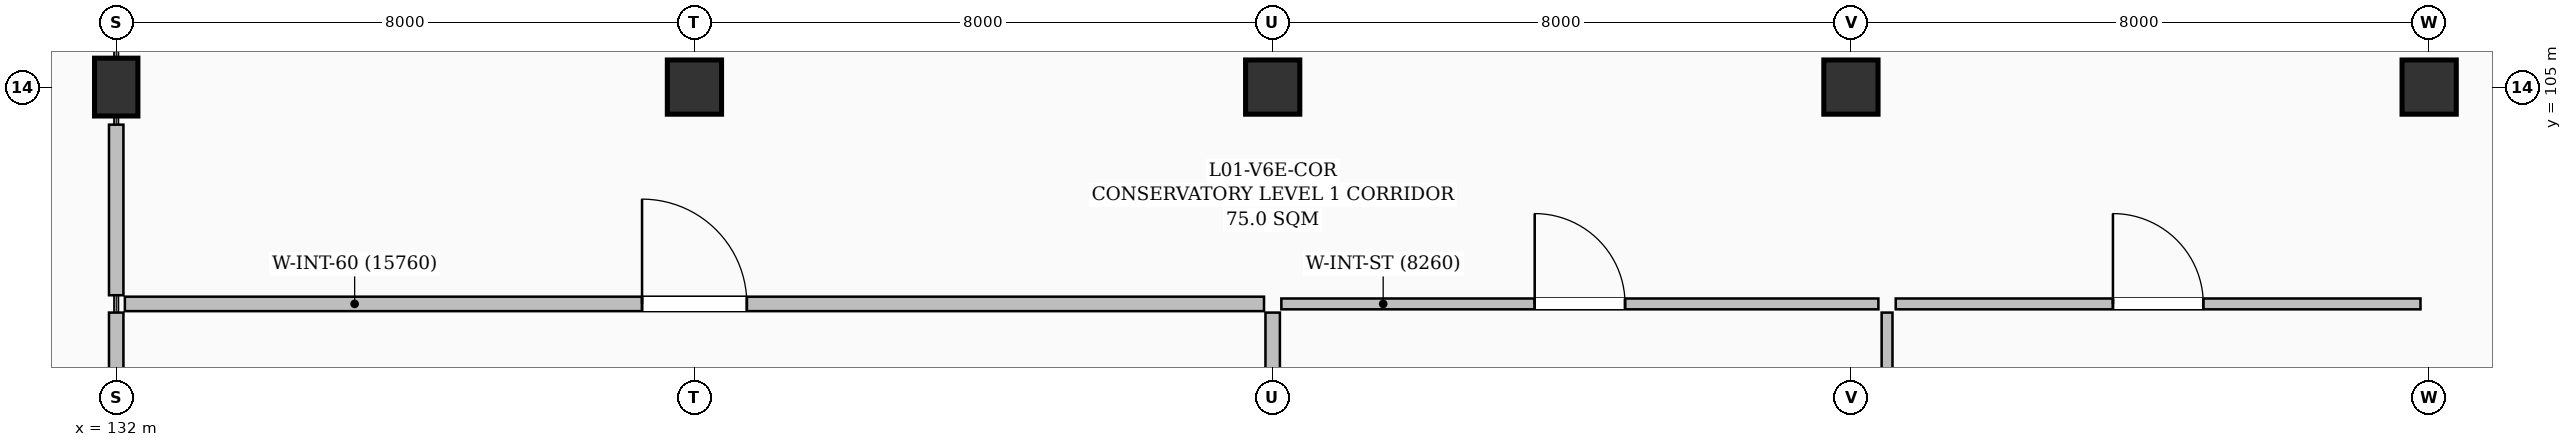
"""IFC4 building model, lengths in metres.
Left out: names, types, materials, properties, quantities, classifications, styles, units other than length and angle.
Written with IfcOpenShell. Run it as: python <this file> out.ifc"""

import sys

from ifc_helpers import new_model, si_unit, direction, frame, frame_2d, origin, origin_2d, place, context, subcontext, project, spatial, rectangle, extrude, element, fill, save


model = new_model("IFC4")
c1 = context("Model", 3, precision=1e-05, world=origin(), true_north=direction((0.0, 1.0)))
c2 = subcontext(c1, "Body", "Model", "MODEL_VIEW")
j1 = project(units=[si_unit("LENGTHUNIT", "METRE"), si_unit("PLANEANGLEUNIT", "RADIAN")], contexts=[c1])
p1 = place(None, origin())
s1 = spatial("IfcSite", under=j1, at=p1, CompositionType="ELEMENT")
p2 = place(p1, origin())
s2 = spatial("IfcBuilding", under=s1, at=p2, CompositionType="ELEMENT")
p3 = place(p2, frame((0.0, 0.0, 4.8)))
s3 = spatial("IfcBuildingStorey", under=s2, at=p3, CompositionType="ELEMENT", Elevation=4.8)
p4 = place(p3, frame((132.0, 105.0, 0.0), z_axis=(0.0, 0.0, 1.0), x_axis=(1.0, 0.0, 0.0)))
e1 = element("IfcColumn", 1, at=p4, inside=s3, PredefinedType="COLUMN", context=c2, shape_type="SweptSolid", body=[
    extrude(rectangle(XDim=0.6, YDim=0.8, at=origin_2d()), origin(), (0.0, 0.0, 1.0), 4.5),
])
for number, where, z_axis, x_axis in (
    (2, (140.0, 105.0, 0.0), (0.0, 0.0, 1.0), (1.0, 0.0, 0.0)),
    (3, (148.0, 105.0, 0.0), (0.0, 0.0, 1.0), (1.0, 0.0, 0.0)),
    (4, (156.0, 105.0, 0.0), (0.0, 0.0, 1.0), (1.0, 0.0, 0.0)),
    (5, (164.0, 105.0, 0.0), (0.0, 0.0, 1.0), (1.0, 0.0, 0.0)),
):
    element("IfcColumn", number, at=place(p3, frame(where, z_axis=z_axis, x_axis=x_axis)), inside=s3, PredefinedType="COLUMN", context=c2, shape_type="SweptSolid", body=[
        extrude(rectangle(XDim=0.75, YDim=0.75, at=origin_2d()), origin(), (0.0, 0.0, 1.0), 4.5),
    ])
p5 = place(p3, frame((132.0, 95.42, 0.0), z_axis=(0.0, 0.0, 1.0), x_axis=(0.0, 1.0, 0.0)))
e6 = element("IfcWall", 6, at=p5, inside=s3, PredefinedType="PARTITIONING", context=c2, shape_type="SweptSolid", body=[
    extrude(rectangle(XDim=6.46, YDim=0.2, at=frame_2d((3.23, 0.0))), origin(), (0.0, 0.0, 1.0), 3.785),
])
p6 = place(p5, frame((2.505, 0.0, 0.0)))
e7 = element("IfcOpeningElement", 7, at=p6, cuts=e6, PredefinedType="OPENING", context=c2, shape_type="SweptSolid", body=[
    extrude(rectangle(XDim=1.45, YDim=2.25, at=frame_2d((0.725, 1.125))), frame((0.0, 0.11, 0.0), z_axis=(0.0, -1.0, 0.0), x_axis=(1.0, 0.0, 0.0)), (0.0, 0.0, 1.0), 0.22),
])
p7 = place(p3, frame((132.0, 102.12, 0.0), z_axis=(0.0, 0.0, 1.0), x_axis=(0.0, 1.0, 0.0)))
e8 = element("IfcWall", 8, at=p7, inside=s3, PredefinedType="PARTITIONING", context=c2, shape_type="SweptSolid", body=[
    extrude(rectangle(XDim=2.36, YDim=0.2, at=frame_2d((1.18, 0.0))), origin(), (0.0, 0.0, 1.0), 3.785),
])
p8 = place(p3, frame((132.12, 102.0, 0.0), z_axis=(0.0, 0.0, 1.0), x_axis=(1.0, 0.0, 0.0)))
e9 = element("IfcWall", 9, at=p8, inside=s3, PredefinedType="PARTITIONING", context=c2, shape_type="SweptSolid", body=[
    extrude(rectangle(XDim=15.76, YDim=0.2, at=frame_2d((7.88, 0.0))), origin(), (0.0, 0.0, 1.0), 3.875),
])
p9 = place(p8, frame((7.155, 0.0, 0.0)))
e10 = element("IfcOpeningElement", 10, at=p9, cuts=e9, PredefinedType="OPENING", context=c2, shape_type="SweptSolid", body=[
    extrude(rectangle(XDim=1.45, YDim=2.25, at=frame_2d((0.725, 1.125))), frame((0.0, 0.11, 0.0), z_axis=(0.0, -1.0, 0.0), x_axis=(1.0, 0.0, 0.0)), (0.0, 0.0, 1.0), 0.22),
])
p10 = place(p3, frame((148.0, 95.395, 0.0), z_axis=(0.0, 0.0, 1.0), x_axis=(0.0, 1.0, 0.0)))
e11 = element("IfcWall", 11, at=p10, inside=s3, PredefinedType="PARTITIONING", context=c2, shape_type="SweptSolid", body=[
    extrude(rectangle(XDim=6.485, YDim=0.2, at=frame_2d((3.242, 0.0))), origin(), (0.0, 0.0, 1.0), 3.385),
])
p11 = place(p10, frame((2.518, 0.0, 0.0)))
e12 = element("IfcOpeningElement", 12, at=p11, cuts=e11, PredefinedType="OPENING", context=c2, shape_type="SweptSolid", body=[
    extrude(rectangle(XDim=1.45, YDim=2.25, at=frame_2d((0.725, 1.125))), frame((0.0, 0.11, 0.0), z_axis=(0.0, -1.0, 0.0), x_axis=(1.0, 0.0, 0.0)), (0.0, 0.0, 1.0), 0.22),
])
p12 = place(p3, frame((156.62, 102.0, 0.0), z_axis=(0.0, 0.0, 1.0), x_axis=(1.0, 0.0, 0.0)))
e13 = element("IfcWall", 13, at=p12, inside=s3, PredefinedType="PARTITIONING", context=c2, shape_type="SweptSolid", body=[
    extrude(rectangle(XDim=7.26, YDim=0.15, at=frame_2d((3.63, 0.0))), origin(), (0.0, 0.0, 1.0), 3.905),
])
p13 = place(p12, frame((3.005, 0.0, 0.0)))
e14 = element("IfcOpeningElement", 14, at=p13, cuts=e13, PredefinedType="OPENING", context=c2, shape_type="SweptSolid", body=[
    extrude(rectangle(XDim=1.25, YDim=2.15, at=frame_2d((0.625, 1.075))), frame((0.0, 0.085, 0.0), z_axis=(0.0, -1.0, 0.0), x_axis=(1.0, 0.0, 0.0)), (0.0, 0.0, 1.0), 0.17),
])
p14 = place(p3, frame((156.5, 95.395, 0.0), z_axis=(0.0, 0.0, 1.0), x_axis=(0.0, 1.0, 0.0)))
e15 = element("IfcWall", 15, at=p14, inside=s3, PredefinedType="PARTITIONING", context=c2, shape_type="SweptSolid", body=[
    extrude(rectangle(XDim=6.485, YDim=0.15, at=frame_2d((3.242, 0.0))), origin(), (0.0, 0.0, 1.0), 4.25),
])
p15 = place(p14, frame((2.617, 0.0, 0.0)))
e16 = element("IfcOpeningElement", 16, at=p15, cuts=e15, PredefinedType="OPENING", context=c2, shape_type="SweptSolid", body=[
    extrude(rectangle(XDim=1.25, YDim=2.15, at=frame_2d((0.625, 1.075))), frame((0.0, 0.085, 0.0), z_axis=(0.0, -1.0, 0.0), x_axis=(1.0, 0.0, 0.0)), (0.0, 0.0, 1.0), 0.17),
])
p16 = place(p3, frame((148.12, 102.0, 0.0), z_axis=(0.0, 0.0, 1.0), x_axis=(1.0, 0.0, 0.0)))
e17 = element("IfcWall", 17, at=p16, inside=s3, PredefinedType="PARTITIONING", context=c2, shape_type="SweptSolid", body=[
    extrude(rectangle(XDim=8.26, YDim=0.15, at=frame_2d((4.13, 0.0))), origin(), (0.0, 0.0, 1.0), 3.995),
])
p17 = place(p16, frame((3.505, 0.0, 0.0)))
e18 = element("IfcOpeningElement", 18, at=p17, cuts=e17, PredefinedType="OPENING", context=c2, shape_type="SweptSolid", body=[
    extrude(rectangle(XDim=1.25, YDim=2.15, at=frame_2d((0.625, 1.075))), frame((0.0, 0.085, 0.0), z_axis=(0.0, -1.0, 0.0), x_axis=(1.0, 0.0, 0.0)), (0.0, 0.0, 1.0), 0.17),
])
p18 = place(p9, origin())
e19 = element("IfcDoor", 19, at=p18, inside=s3, OperationType="SINGLE_SWING_LEFT", PredefinedType="DOOR", context=c2, shape_type="SweptSolid", body=[
    extrude(rectangle(XDim=1.45, YDim=2.25, at=frame_2d((0.725, 1.125))), frame((0.0, 0.025, 0.0), z_axis=(0.0, -1.0, 0.0), x_axis=(1.0, 0.0, 0.0)), (0.0, 0.0, 1.0), 0.05),
])
fill(e10, e19)
p19 = place(p13, origin())
e20 = element("IfcDoor", 20, at=p19, inside=s3, OperationType="SINGLE_SWING_LEFT", PredefinedType="DOOR", context=c2, shape_type="SweptSolid", body=[
    extrude(rectangle(XDim=1.25, YDim=2.15, at=frame_2d((0.625, 1.075))), frame((0.0, 0.025, 0.0), z_axis=(0.0, -1.0, 0.0), x_axis=(1.0, 0.0, 0.0)), (0.0, 0.0, 1.0), 0.05),
])
fill(e14, e20)
p20 = place(p17, origin())
e21 = element("IfcDoor", 21, at=p20, inside=s3, OperationType="SINGLE_SWING_LEFT", PredefinedType="DOOR", context=c2, shape_type="SweptSolid", body=[
    extrude(rectangle(XDim=1.25, YDim=2.15, at=frame_2d((0.625, 1.075))), frame((0.0, 0.025, 0.0), z_axis=(0.0, -1.0, 0.0), x_axis=(1.0, 0.0, 0.0)), (0.0, 0.0, 1.0), 0.05),
])
fill(e18, e21)
save(model, sys.argv[1])
